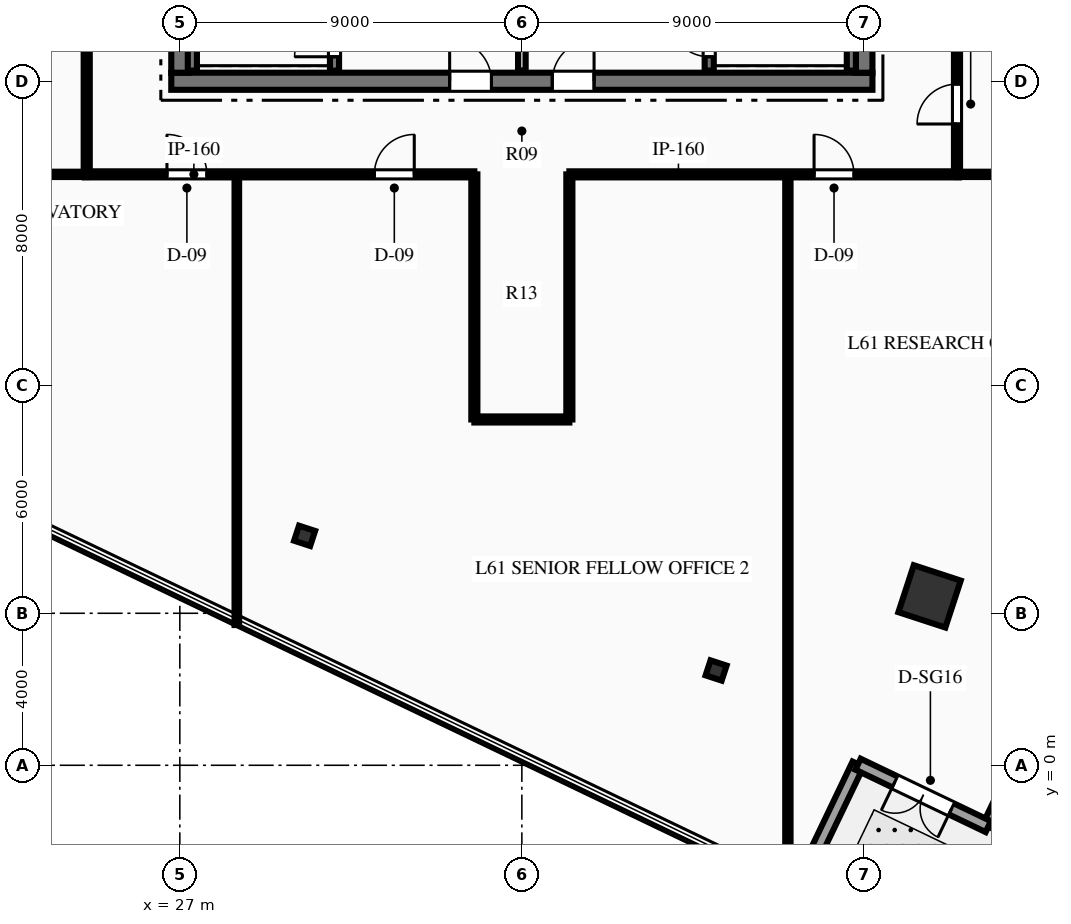
"""IFC4 building model, lengths in metres.
Left out: names, types, materials, properties, quantities, classifications, styles, units other than length and angle.
Written with IfcOpenShell. Run it as: python <this file> out.ifc"""

import sys

from ifc_helpers import new_model, si_unit, direction, frame, frame_2d, origin, origin_2d, place, context, subcontext, project, spatial, rectangle, hollow_rectangle, i_section, extrude, element, fill, save


model = new_model("IFC4")
c1 = context("Model", 3, precision=1e-05, world=origin(), true_north=direction((0.0, 1.0)))
c2 = subcontext(c1, "Body", "Model", "MODEL_VIEW")
j1 = project(units=[si_unit("LENGTHUNIT", "METRE"), si_unit("PLANEANGLEUNIT", "RADIAN")], contexts=[c1])
p1 = place(None, origin())
s1 = spatial("IfcSite", under=j1, at=p1, CompositionType="ELEMENT")
p2 = place(p1, origin())
s2 = spatial("IfcBuilding", under=s1, at=p2, CompositionType="ELEMENT")
p3 = place(p2, frame((0.0, 0.0, 244.2)))
s3 = spatial("IfcBuildingStorey", under=s2, at=p3, CompositionType="ELEMENT", Elevation=244.2)
p4 = place(p3, frame((26.775, 18.0, 0.0), z_axis=(0.0, 0.0, 1.0), x_axis=(1.0, 0.0, 0.0)))
e1 = element("IfcWall", 1, at=p4, inside=s3, PredefinedType="SHEAR", context=c2, shape_type="SweptSolid", body=[
    extrude(rectangle(XDim=18.45, YDim=0.45, at=frame_2d((9.225, 0.0))), origin(), (0.0, 0.0, 1.0), 4.5),
])
p5 = place(p4, frame((7.325, 0.0, 0.0)))
e2 = element("IfcOpeningElement", 2, at=p5, cuts=e1, PredefinedType="OPENING", context=c2, shape_type="SweptSolid", body=[
    extrude(rectangle(XDim=1.1, YDim=2.15, at=frame_2d((0.55, 1.075))), frame((0.0, 0.235, 0.0), z_axis=(0.0, -1.0, 0.0), x_axis=(1.0, 0.0, 0.0)), (0.0, 0.0, 1.0), 0.47),
])
p6 = place(p4, frame((10.025, 0.0, 0.0)))
e3 = element("IfcOpeningElement", 3, at=p6, cuts=e1, PredefinedType="OPENING", context=c2, shape_type="SweptSolid", body=[
    extrude(rectangle(XDim=1.1, YDim=2.15, at=frame_2d((0.55, 1.075))), frame((0.0, 0.235, 0.0), z_axis=(0.0, -1.0, 0.0), x_axis=(1.0, 0.0, 0.0)), (0.0, 0.0, 1.0), 0.47),
])
p7 = place(p3, frame((27.0, 18.225, 0.0), z_axis=(0.0, 0.0, 1.0), x_axis=(0.0, 1.0, 0.0)))
e4 = element("IfcWall", 4, at=p7, inside=s3, PredefinedType="SHEAR", context=c2, shape_type="SweptSolid", body=[
    extrude(rectangle(XDim=15.55, YDim=0.45, at=frame_2d((7.775, 0.0))), origin(), (0.0, 0.0, 1.0), 4.5),
])
p8 = place(p7, frame((10.015, 0.0, 0.0)))
e5 = element("IfcOpeningElement", 5, at=p8, cuts=e4, PredefinedType="OPENING", context=c2, shape_type="SweptSolid", body=[
    extrude(rectangle(XDim=1.4, YDim=2.2, at=frame_2d((0.7, 1.1))), frame((0.0, 0.235, 0.0), z_axis=(0.0, -1.0, 0.0), x_axis=(1.0, 0.0, 0.0)), (0.0, 0.0, 1.0), 0.47),
])
p9 = place(p3, frame((45.0, 18.225, 0.0), z_axis=(0.0, 0.0, 1.0), x_axis=(0.0, 1.0, 0.0)))
e6 = element("IfcWall", 6, at=p9, inside=s3, PredefinedType="SHEAR", context=c2, shape_type="SweptSolid", body=[
    extrude(rectangle(XDim=15.55, YDim=0.45, at=frame_2d((7.775, 0.0))), origin(), (0.0, 0.0, 1.0), 4.5),
])
p10 = place(p9, frame((10.015, 0.0, 0.0)))
e7 = element("IfcOpeningElement", 7, at=p10, cuts=e6, PredefinedType="OPENING", context=c2, shape_type="SweptSolid", body=[
    extrude(rectangle(XDim=1.4, YDim=2.2, at=frame_2d((0.7, 1.1))), frame((0.0, 0.235, 0.0), z_axis=(0.0, -1.0, 0.0), x_axis=(1.0, 0.0, 0.0)), (0.0, 0.0, 1.0), 0.47),
])
p11 = place(p3, frame((31.07, 18.28, 0.0), z_axis=(0.0, 0.0, 1.0), x_axis=(0.0, 1.0, 0.0)))
e8 = element("IfcWall", 8, at=p11, inside=s3, PredefinedType="SHEAR", context=c2, shape_type="SweptSolid", body=[
    extrude(rectangle(XDim=8.26, YDim=0.24, at=frame_2d((4.13, 0.0))), origin(), (0.0, 0.0, 1.0), 4.5),
])
p12 = place(p11, frame((0.365, 0.0, 0.0)))
e9 = element("IfcOpeningElement", 9, at=p12, cuts=e8, PredefinedType="OPENING", context=c2, shape_type="SweptSolid", body=[
    extrude(rectangle(XDim=1.05, YDim=2.15, at=frame_2d((0.525, 1.075))), frame((0.0, 0.13, 0.0), z_axis=(0.0, -1.0, 0.0), x_axis=(1.0, 0.0, 0.0)), (0.0, 0.0, 1.0), 0.26),
])
p13 = place(p3, frame((27.33, 18.28, 0.0), z_axis=(0.0, 0.0, 1.0), x_axis=(0.0, 1.0, 0.0)))
e10 = element("IfcWall", 10, at=p13, inside=s3, PredefinedType="SHEAR", context=c2, shape_type="SweptSolid", body=[
    extrude(rectangle(XDim=8.26, YDim=0.24, at=frame_2d((4.13, 0.0))), origin(), (0.0, 0.0, 1.0), 4.5),
])
p14 = place(p3, frame((40.93, 18.28, 0.0), z_axis=(0.0, 0.0, 1.0), x_axis=(0.0, 1.0, 0.0)))
e11 = element("IfcWall", 11, at=p14, inside=s3, PredefinedType="SHEAR", context=c2, shape_type="SweptSolid", body=[
    extrude(rectangle(XDim=8.26, YDim=0.24, at=frame_2d((4.13, 0.0))), origin(), (0.0, 0.0, 1.0), 4.5),
])
p15 = place(p14, frame((0.365, 0.0, 0.0)))
e12 = element("IfcOpeningElement", 12, at=p15, cuts=e11, PredefinedType="OPENING", context=c2, shape_type="SweptSolid", body=[
    extrude(rectangle(XDim=1.05, YDim=2.15, at=frame_2d((0.525, 1.075))), frame((0.0, 0.13, 0.0), z_axis=(0.0, -1.0, 0.0), x_axis=(1.0, 0.0, 0.0)), (0.0, 0.0, 1.0), 0.26),
])
p16 = place(p3, frame((44.67, 18.28, 0.0), z_axis=(0.0, 0.0, 1.0), x_axis=(0.0, 1.0, 0.0)))
e13 = element("IfcWall", 13, at=p16, inside=s3, PredefinedType="SHEAR", context=c2, shape_type="SweptSolid", body=[
    extrude(rectangle(XDim=8.26, YDim=0.24, at=frame_2d((4.13, 0.0))), origin(), (0.0, 0.0, 1.0), 4.5),
])
p17 = place(p3, frame((46.728, 4.445, 0.0), z_axis=(0.0, 0.0, 1.0), x_axis=(0.311008203279, 0.950407227189, 0.0)))
e14 = element("IfcColumn", 14, at=p17, inside=s3, PredefinedType="COLUMN", context=c2, shape_type="SweptSolid", body=[
    extrude(hollow_rectangle(XDim=1.3, YDim=1.3, WallThickness=0.06, at=origin_2d()), origin(), (0.0, 0.0, 1.0), 4.5),
])
for number, where, z_axis, x_axis in (
    (15, (30.283, 6.038, 0.0), (0.0, 0.0, 1.0), (0.311, 0.95, 0.0)),
    (16, (41.111, 2.495, 0.0), (0.0, 0.0, 1.0), (0.311, 0.95, 0.0)),
):
    element("IfcColumn", number, at=place(p3, frame(where, z_axis=z_axis, x_axis=x_axis)), inside=s3, PredefinedType="COLUMN", context=c2, shape_type="SweptSolid", body=[
        extrude(i_section(OverallWidth=0.416, OverallDepth=0.445, WebThickness=0.039, FlangeThickness=0.063, at=origin_2d()), origin(), (0.0, 0.0, 1.0), 4.5),
    ])
p18 = place(p3, frame((48.662, -0.802, 0.0), z_axis=(0.0, 0.0, 1.0), x_axis=(-0.432069629268, -0.901840249414, 0.0)))
e17 = element("IfcWall", 17, at=p18, inside=s3, PredefinedType="STANDARD", context=c2, shape_type="SweptSolid", body=[
    extrude(rectangle(XDim=0.9, YDim=0.32, at=frame_2d((0.45, 0.0))), origin(), (0.0, 0.0, 1.0), 4.23),
])
p19 = place(p3, frame((44.846, 0.028, 0.0), z_axis=(0.0, 0.0, 1.0), x_axis=(-0.432064663211, -0.901842628624, 0.0)))
e18 = element("IfcWall", 18, at=p19, inside=s3, PredefinedType="STANDARD", context=c2, shape_type="SweptSolid", body=[
    extrude(rectangle(XDim=3.8, YDim=0.32, at=frame_2d((1.9, 0.0))), origin(), (0.0, 0.0, 1.0), 4.23),
])
p20 = place(p3, frame((48.273, -1.614, 0.0), z_axis=(0.0, 0.0, 1.0), x_axis=(-0.901817593476, 0.432116914848, 0.0)))
e19 = element("IfcWall", 19, at=p20, inside=s3, PredefinedType="STANDARD", context=c2, shape_type="SweptSolid", body=[
    extrude(rectangle(XDim=3.8, YDim=0.32, at=frame_2d((1.9, 0.0))), origin(), (0.0, 0.0, 1.0), 4.23),
])
p21 = place(p20, frame((1.075, 0.0, 0.0)))
e20 = element("IfcOpeningElement", 20, at=p21, cuts=e19, PredefinedType="OPENING", context=c2, shape_type="SweptSolid", body=[
    extrude(rectangle(XDim=1.65, YDim=2.35, at=frame_2d((0.825, 1.175))), frame((0.0, 0.17, 0.0), z_axis=(0.0, -1.0, 0.0), x_axis=(1.0, 0.0, 0.0)), (0.0, 0.0, 1.0), 0.34),
])
p22 = place(p3, frame((36.0, 18.28, 0.0), z_axis=(0.0, 0.0, 1.0), x_axis=(0.0, 1.0, 0.0)))
e21 = element("IfcWall", 21, at=p22, inside=s3, PredefinedType="PARTITIONING", context=c2, shape_type="SweptSolid", body=[
    extrude(rectangle(XDim=3.77, YDim=0.2, at=frame_2d((1.885, 0.0))), origin(), (0.0, 0.0, 1.0), 4.23),
])
p23 = place(p3, frame((24.5, 15.55, 0.0), z_axis=(0.0, 0.0, 1.0), x_axis=(1.0, 0.0, 0.0)))
e22 = element("IfcWall", 22, at=p23, inside=s3, PredefinedType="PARTITIONING", context=c2, shape_type="SweptSolid", body=[
    extrude(rectangle(XDim=10.25, YDim=0.16, at=frame_2d((5.125, 0.0))), origin(), (0.0, 0.0, 1.0), 4.23),
])
p24 = place(p23, frame((2.161, 0.0, 0.0)))
e23 = element("IfcOpeningElement", 23, at=p24, cuts=e22, PredefinedType="OPENING", context=c2, shape_type="SweptSolid", body=[
    extrude(rectangle(XDim=1.05, YDim=2.15, at=frame_2d((0.525, 1.075))), frame((0.0, 0.09, 0.0), z_axis=(0.0, -1.0, 0.0), x_axis=(1.0, 0.0, 0.0)), (0.0, 0.0, 1.0), 0.18),
])
p25 = place(p23, frame((7.619, 0.0, 0.0)))
e24 = element("IfcOpeningElement", 24, at=p25, cuts=e22, PredefinedType="OPENING", context=c2, shape_type="SweptSolid", body=[
    extrude(rectangle(XDim=1.05, YDim=2.15, at=frame_2d((0.525, 1.075))), frame((0.0, 0.09, 0.0), z_axis=(0.0, -1.0, 0.0), x_axis=(1.0, 0.0, 0.0)), (0.0, 0.0, 1.0), 0.18),
])
p26 = place(p3, frame((37.25, 15.55, 0.0), z_axis=(0.0, 0.0, 1.0), x_axis=(1.0, 0.0, 0.0)))
e25 = element("IfcWall", 25, at=p26, inside=s3, PredefinedType="PARTITIONING", context=c2, shape_type="SweptSolid", body=[
    extrude(rectangle(XDim=10.25, YDim=0.16, at=frame_2d((5.125, 0.0))), origin(), (0.0, 0.0, 1.0), 4.23),
])
p27 = place(p26, frame((6.439, 0.0, 0.0)))
e26 = element("IfcOpeningElement", 26, at=p27, cuts=e25, PredefinedType="OPENING", context=c2, shape_type="SweptSolid", body=[
    extrude(rectangle(XDim=1.05, YDim=2.15, at=frame_2d((0.525, 1.075))), frame((0.0, 0.09, 0.0), z_axis=(0.0, -1.0, 0.0), x_axis=(1.0, 0.0, 0.0)), (0.0, 0.0, 1.0), 0.18),
])
p28 = place(p3, frame((24.55, 15.55, 0.0), z_axis=(0.0, 0.0, 1.0), x_axis=(0.0, 1.0, 0.0)))
e27 = element("IfcWall", 27, at=p28, inside=s3, PredefinedType="PARTITIONING", context=c2, shape_type="SweptSolid", body=[
    extrude(rectangle(XDim=9.2, YDim=0.16, at=frame_2d((4.6, 0.0))), origin(), (0.0, 0.0, 1.0), 4.23),
])
p29 = place(p28, frame((3.407, 0.0, 0.0)))
e28 = element("IfcOpeningElement", 28, at=p29, cuts=e27, PredefinedType="OPENING", context=c2, shape_type="SweptSolid", body=[
    extrude(rectangle(XDim=1.05, YDim=2.15, at=frame_2d((0.525, 1.075))), frame((0.0, 0.09, 0.0), z_axis=(0.0, -1.0, 0.0), x_axis=(1.0, 0.0, 0.0)), (0.0, 0.0, 1.0), 0.18),
])
p30 = place(p3, frame((47.45, 15.55, 0.0), z_axis=(0.0, 0.0, 1.0), x_axis=(0.0, 1.0, 0.0)))
e29 = element("IfcWall", 29, at=p30, inside=s3, PredefinedType="PARTITIONING", context=c2, shape_type="SweptSolid", body=[
    extrude(rectangle(XDim=9.2, YDim=0.16, at=frame_2d((4.6, 0.0))), origin(), (0.0, 0.0, 1.0), 4.23),
])
p31 = place(p30, frame((1.325, 0.0, 0.0)))
e30 = element("IfcOpeningElement", 30, at=p31, cuts=e29, PredefinedType="OPENING", context=c2, shape_type="SweptSolid", body=[
    extrude(rectangle(XDim=1.05, YDim=2.15, at=frame_2d((0.525, 1.075))), frame((0.0, 0.09, 0.0), z_axis=(0.0, -1.0, 0.0), x_axis=(1.0, 0.0, 0.0)), (0.0, 0.0, 1.0), 0.18),
])
for number, where, z_axis, x_axis in (
    (31, (34.75, 9.1, 0.0), (0.0, 0.0, 1.0), (0.0, 1.0, 0.0)),
    (32, (37.25, 9.1, 0.0), (0.0, 0.0, 1.0), (0.0, 1.0, 0.0)),
):
    element("IfcWall", number, at=place(p3, frame(where, z_axis=z_axis, x_axis=x_axis)), inside=s3, PredefinedType="PARTITIONING", context=c2, shape_type="SweptSolid", body=[
        extrude(rectangle(XDim=6.45, YDim=0.16, at=frame_2d((3.225, 0.0))), origin(), (0.0, 0.0, 1.0), 4.23),
    ])
p32 = place(p3, frame((34.75, 9.1, 0.0), z_axis=(0.0, 0.0, 1.0), x_axis=(1.0, 0.0, 0.0)))
e33 = element("IfcWall", 33, at=p32, inside=s3, PredefinedType="PARTITIONING", context=c2, shape_type="SweptSolid", body=[
    extrude(rectangle(XDim=2.5, YDim=0.16, at=frame_2d((1.25, 0.0))), origin(), (0.0, 0.0, 1.0), 4.23),
])
p33 = place(p3, frame((11.3, 15.55, 0.0), z_axis=(0.0, 0.0, 1.0), x_axis=(1.0, 0.0, 0.0)))
e34 = element("IfcWall", 34, at=p33, inside=s3, PredefinedType="PARTITIONING", context=c2, shape_type="SweptSolid", body=[
    extrude(rectangle(XDim=13.25, YDim=0.14, at=frame_2d((6.625, 0.0))), origin(), (0.0, 0.0, 1.0), 3.608),
])
p34 = place(p3, frame((47.45, 15.55, 0.0), z_axis=(0.0, 0.0, 1.0), x_axis=(1.0, 0.0, 0.0)))
e35 = element("IfcWall", 35, at=p34, inside=s3, PredefinedType="PARTITIONING", context=c2, shape_type="SweptSolid", body=[
    extrude(rectangle(XDim=9.002, YDim=0.14, at=frame_2d((4.501, 0.0))), origin(), (0.0, 0.0, 1.0), 4.23),
])
p35 = place(p3, frame((28.5, 3.691, 0.0), z_axis=(0.0, 0.0, 1.0), x_axis=(0.0, 1.0, 0.0)))
e36 = element("IfcWall", 36, at=p35, inside=s3, PredefinedType="PARTITIONING", context=c2, shape_type="SweptSolid", body=[
    extrude(rectangle(XDim=11.859, YDim=0.12, at=frame_2d((5.93, 0.0))), origin(), (0.0, 0.0, 1.0), 4.23),
])
p36 = place(p3, frame((43.0, -3.257, 0.0), z_axis=(0.0, 0.0, 1.0), x_axis=(0.0, 1.0, 0.0)))
e37 = element("IfcWall", 37, at=p36, inside=s3, PredefinedType="PARTITIONING", context=c2, shape_type="SweptSolid", body=[
    extrude(rectangle(XDim=18.807, YDim=0.14, at=frame_2d((9.403, 0.0))), origin(), (0.0, 0.0, 1.0), 4.23),
])
p37 = place(p21, origin())
e38 = element("IfcDoor", 38, at=p37, inside=s3, OperationType="DOUBLE_DOOR_SINGLE_SWING", PredefinedType="DOOR", context=c2, shape_type="SweptSolid", body=[
    extrude(rectangle(XDim=1.65, YDim=2.35, at=frame_2d((0.825, 1.175))), frame((0.0, 0.025, 0.0), z_axis=(0.0, -1.0, 0.0), x_axis=(1.0, 0.0, 0.0)), (0.0, 0.0, 1.0), 0.05),
])
fill(e20, e38)
p38 = place(p12, origin())
e39 = element("IfcDoor", 39, at=p38, inside=s3, OperationType="SINGLE_SWING_LEFT", PredefinedType="DOOR", context=c2, shape_type="SweptSolid", body=[
    extrude(rectangle(XDim=1.05, YDim=2.15, at=frame_2d((0.525, 1.075))), frame((0.0, 0.025, 0.0), z_axis=(0.0, -1.0, 0.0), x_axis=(1.0, 0.0, 0.0)), (0.0, 0.0, 1.0), 0.05),
])
fill(e9, e39)
p39 = place(p15, origin())
e40 = element("IfcDoor", 40, at=p39, inside=s3, OperationType="SINGLE_SWING_RIGHT", PredefinedType="DOOR", context=c2, shape_type="SweptSolid", body=[
    extrude(rectangle(XDim=1.05, YDim=2.15, at=frame_2d((0.525, 1.075))), frame((0.0, 0.025, 0.0), z_axis=(0.0, -1.0, 0.0), x_axis=(1.0, 0.0, 0.0)), (0.0, 0.0, 1.0), 0.05),
])
fill(e12, e40)
p40 = place(p5, origin())
e41 = element("IfcDoor", 41, at=p40, inside=s3, OperationType="SINGLE_SWING_LEFT", PredefinedType="DOOR", context=c2, shape_type="SweptSolid", body=[
    extrude(rectangle(XDim=1.1, YDim=2.15, at=frame_2d((0.55, 1.075))), frame((0.0, 0.025, 0.0), z_axis=(0.0, -1.0, 0.0), x_axis=(1.0, 0.0, 0.0)), (0.0, 0.0, 1.0), 0.05),
])
fill(e2, e41)
p41 = place(p6, origin())
e42 = element("IfcDoor", 42, at=p41, inside=s3, OperationType="SINGLE_SWING_RIGHT", PredefinedType="DOOR", context=c2, shape_type="SweptSolid", body=[
    extrude(rectangle(XDim=1.1, YDim=2.15, at=frame_2d((0.55, 1.075))), frame((0.0, 0.025, 0.0), z_axis=(0.0, -1.0, 0.0), x_axis=(1.0, 0.0, 0.0)), (0.0, 0.0, 1.0), 0.05),
])
fill(e3, e42)
p42 = place(p24, origin())
e43 = element("IfcDoor", 43, at=p42, inside=s3, OperationType="SINGLE_SWING_LEFT", PredefinedType="DOOR", context=c2, shape_type="SweptSolid", body=[
    extrude(rectangle(XDim=1.05, YDim=2.15, at=frame_2d((0.525, 1.075))), frame((0.0, 0.025, 0.0), z_axis=(0.0, -1.0, 0.0), x_axis=(1.0, 0.0, 0.0)), (0.0, 0.0, 1.0), 0.05),
])
fill(e23, e43)
p43 = place(p25, origin())
e44 = element("IfcDoor", 44, at=p43, inside=s3, OperationType="SINGLE_SWING_RIGHT", PredefinedType="DOOR", context=c2, shape_type="SweptSolid", body=[
    extrude(rectangle(XDim=1.05, YDim=2.15, at=frame_2d((0.525, 1.075))), frame((0.0, 0.025, 0.0), z_axis=(0.0, -1.0, 0.0), x_axis=(1.0, 0.0, 0.0)), (0.0, 0.0, 1.0), 0.05),
])
fill(e24, e44)
p44 = place(p27, origin())
e45 = element("IfcDoor", 45, at=p44, inside=s3, OperationType="SINGLE_SWING_LEFT", PredefinedType="DOOR", context=c2, shape_type="SweptSolid", body=[
    extrude(rectangle(XDim=1.05, YDim=2.15, at=frame_2d((0.525, 1.075))), frame((0.0, 0.025, 0.0), z_axis=(0.0, -1.0, 0.0), x_axis=(1.0, 0.0, 0.0)), (0.0, 0.0, 1.0), 0.05),
])
fill(e26, e45)
p45 = place(p31, origin())
e46 = element("IfcDoor", 46, at=p45, inside=s3, OperationType="SINGLE_SWING_LEFT", PredefinedType="DOOR", context=c2, shape_type="SweptSolid", body=[
    extrude(rectangle(XDim=1.05, YDim=2.15, at=frame_2d((0.525, 1.075))), frame((0.0, 0.025, 0.0), z_axis=(0.0, -1.0, 0.0), x_axis=(1.0, 0.0, 0.0)), (0.0, 0.0, 1.0), 0.05),
])
fill(e30, e46)
save(model, sys.argv[1])
